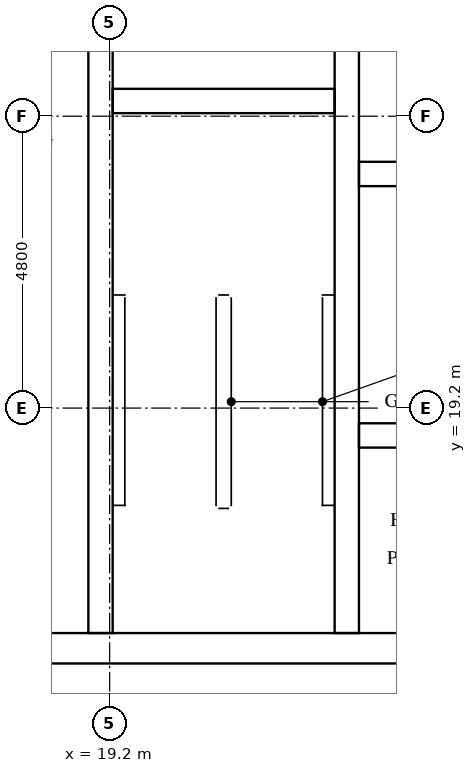
"""IFC4 building model, lengths in metres.
Left out: names, types, materials, properties, quantities, classifications, styles, units other than length and angle.
Written with IfcOpenShell. Run it as: python <this file> out.ifc"""

import sys

from ifc_helpers import new_model, si_unit, direction, frame, frame_2d, origin, place, context, subcontext, project, spatial, rectangle, extrude, element, fill, save


model = new_model("IFC4")
c1 = context("Model", 3, precision=1e-05, world=origin(), true_north=direction((0.0, 1.0)))
c2 = subcontext(c1, "Body", "Model", "MODEL_VIEW")
j1 = project(units=[si_unit("LENGTHUNIT", "METRE"), si_unit("PLANEANGLEUNIT", "RADIAN")], contexts=[c1])
p1 = place(None, origin())
s1 = spatial("IfcSite", under=j1, at=p1, CompositionType="ELEMENT")
p2 = place(p1, origin())
s2 = spatial("IfcBuilding", under=s1, at=p2, CompositionType="ELEMENT")
p3 = place(p2, frame((0.0, 0.0, 310.1)))
s3 = spatial("IfcBuildingStorey", under=s2, at=p3, CompositionType="ELEMENT", Elevation=310.1)
p4 = place(p3, frame((15.0, 15.25, 0.0), z_axis=(0.0, 0.0, 1.0), x_axis=(1.0, 0.0, 0.0)))
e1 = element("IfcWall", 1, at=p4, inside=s3, PredefinedType="SHEAR", context=c2, shape_type="SweptSolid", body=[
    extrude(rectangle(XDim=32.4, YDim=0.5, at=frame_2d((16.2, 0.0))), origin(), (0.0, 0.0, 1.0), 3.8),
])
p5 = place(p4, frame((15.3, 0.0, 0.0)))
e2 = element("IfcOpeningElement", 2, at=p5, cuts=e1, PredefinedType="OPENING", context=c2, shape_type="SweptSolid", body=[
    extrude(rectangle(XDim=1.8, YDim=2.1, at=frame_2d((0.9, 1.05))), frame((0.0, 0.26, 0.0), z_axis=(0.0, -1.0, 0.0), x_axis=(1.0, 0.0, 0.0)), (0.0, 0.0, 1.0), 0.52),
])
p6 = place(p3, frame((19.05, 15.5, 0.0), z_axis=(0.0, 0.0, 1.0), x_axis=(0.0, 1.0, 0.0)))
e3 = element("IfcWall", 3, at=p6, inside=s3, PredefinedType="SHEAR", context=c2, shape_type="SweptSolid", body=[
    extrude(rectangle(XDim=15.55, YDim=0.4, at=frame_2d((7.775, 0.0))), origin(), (0.0, 0.0, 1.0), 3.8),
])
p7 = place(p6, frame((9.95, 0.0, 0.0)))
e4 = element("IfcOpeningElement", 4, at=p7, cuts=e3, PredefinedType="OPENING", context=c2, shape_type="SweptSolid", body=[
    extrude(rectangle(XDim=1.1, YDim=2.1, at=frame_2d((0.55, 1.05))), frame((0.0, 0.21, 0.0), z_axis=(0.0, -1.0, 0.0), x_axis=(1.0, 0.0, 0.0)), (0.0, 0.0, 1.0), 0.42),
])
p8 = place(p6, frame((13.45, 0.0, 0.0)))
e5 = element("IfcOpeningElement", 5, at=p8, cuts=e3, PredefinedType="OPENING", context=c2, shape_type="SweptSolid", body=[
    extrude(rectangle(XDim=1.1, YDim=2.1, at=frame_2d((0.55, 1.05))), frame((0.0, 0.21, 0.0), z_axis=(0.0, -1.0, 0.0), x_axis=(1.0, 0.0, 0.0)), (0.0, 0.0, 1.0), 0.42),
])
p9 = place(p6, frame((0.7, 0.0, 0.0)))
e6 = element("IfcOpeningElement", 6, at=p9, cuts=e3, PredefinedType="OPENING", context=c2, shape_type="SweptSolid", body=[
    extrude(rectangle(XDim=1.2, YDim=2.1, at=frame_2d((0.6, 1.05))), frame((0.0, 0.21, 0.0), z_axis=(0.0, -1.0, 0.0), x_axis=(1.0, 0.0, 0.0)), (0.0, 0.0, 1.0), 0.42),
])
p10 = place(p3, frame((23.1, 15.5, 0.0), z_axis=(0.0, 0.0, 1.0), x_axis=(0.0, 1.0, 0.0)))
e7 = element("IfcWall", 7, at=p10, inside=s3, PredefinedType="SHEAR", context=c2, shape_type="SweptSolid", body=[
    extrude(rectangle(XDim=21.8, YDim=0.4, at=frame_2d((10.9, 0.0))), origin(), (0.0, 0.0, 1.0), 3.8),
])
p11 = place(p3, frame((19.25, 24.25, 0.0), z_axis=(0.0, 0.0, 1.0), x_axis=(1.0, 0.0, 0.0)))
e8 = element("IfcWall", 8, at=p11, inside=s3, PredefinedType="SHEAR", context=c2, shape_type="SweptSolid", body=[
    extrude(rectangle(XDim=3.65, YDim=0.4, at=frame_2d((1.825, 0.0))), origin(), (0.0, 0.0, 1.0), 3.8),
])
p12 = place(p3, frame((23.3, 18.75, 0.0), z_axis=(0.0, 0.0, 1.0), x_axis=(1.0, 0.0, 0.0)))
e9 = element("IfcWall", 9, at=p12, inside=s3, PredefinedType="SHEAR", context=c2, shape_type="SweptSolid", body=[
    extrude(rectangle(XDim=5.6, YDim=0.4, at=frame_2d((2.8, 0.0))), origin(), (0.0, 0.0, 1.0), 3.8),
])
p13 = place(p12, frame((0.984, 0.0, 0.0)))
e10 = element("IfcOpeningElement", 10, at=p13, cuts=e9, PredefinedType="OPENING", context=c2, shape_type="SweptSolid", body=[
    extrude(rectangle(XDim=1.0, YDim=2.1, at=frame_2d((0.5, 1.05))), frame((0.0, 0.21, 0.0), z_axis=(0.0, -1.0, 0.0), x_axis=(1.0, 0.0, 0.0)), (0.0, 0.0, 1.0), 0.42),
])
p14 = place(p12, frame((3.684, 0.0, 0.0)))
e11 = element("IfcOpeningElement", 11, at=p14, cuts=e9, PredefinedType="OPENING", context=c2, shape_type="SweptSolid", body=[
    extrude(rectangle(XDim=1.0, YDim=2.1, at=frame_2d((0.5, 1.05))), frame((0.0, 0.21, 0.0), z_axis=(0.0, -1.0, 0.0), x_axis=(1.0, 0.0, 0.0)), (0.0, 0.0, 1.0), 0.42),
])
p15 = place(p3, frame((23.3, 23.05, 0.0), z_axis=(0.0, 0.0, 1.0), x_axis=(1.0, 0.0, 0.0)))
e12 = element("IfcWall", 12, at=p15, inside=s3, PredefinedType="SHEAR", context=c2, shape_type="SweptSolid", body=[
    extrude(rectangle(XDim=15.8, YDim=0.4, at=frame_2d((7.9, 0.0))), origin(), (0.0, 0.0, 1.0), 3.8),
])
p16 = place(p15, frame((1.662, 0.0, 0.0)))
e13 = element("IfcOpeningElement", 13, at=p16, cuts=e12, PredefinedType="OPENING", context=c2, shape_type="SweptSolid", body=[
    extrude(rectangle(XDim=1.0, YDim=2.1, at=frame_2d((0.5, 1.05))), frame((0.0, 0.21, 0.0), z_axis=(0.0, -1.0, 0.0), x_axis=(1.0, 0.0, 0.0)), (0.0, 0.0, 1.0), 0.42),
])
p17 = place(p15, frame((5.662, 0.0, 0.0)))
e14 = element("IfcOpeningElement", 14, at=p17, cuts=e12, PredefinedType="OPENING", context=c2, shape_type="SweptSolid", body=[
    extrude(rectangle(XDim=1.0, YDim=2.1, at=frame_2d((0.5, 1.05))), frame((0.0, 0.21, 0.0), z_axis=(0.0, -1.0, 0.0), x_axis=(1.0, 0.0, 0.0)), (0.0, 0.0, 1.0), 0.42),
])
p18 = place(p15, frame((9.612, 0.0, 0.0)))
e15 = element("IfcOpeningElement", 15, at=p18, cuts=e12, PredefinedType="OPENING", context=c2, shape_type="SweptSolid", body=[
    extrude(rectangle(XDim=1.0, YDim=2.1, at=frame_2d((0.5, 1.05))), frame((0.0, 0.21, 0.0), z_axis=(0.0, -1.0, 0.0), x_axis=(1.0, 0.0, 0.0)), (0.0, 0.0, 1.0), 0.42),
])
p19 = place(p15, frame((13.612, 0.0, 0.0)))
e16 = element("IfcOpeningElement", 16, at=p19, cuts=e12, PredefinedType="OPENING", context=c2, shape_type="SweptSolid", body=[
    extrude(rectangle(XDim=1.0, YDim=2.1, at=frame_2d((0.5, 1.05))), frame((0.0, 0.21, 0.0), z_axis=(0.0, -1.0, 0.0), x_axis=(1.0, 0.0, 0.0)), (0.0, 0.0, 1.0), 0.42),
])
p20 = place(p9, frame((1.2, 0.0, 0.0), z_axis=(0.0, 0.0, 1.0), x_axis=(-1.0, 0.0, 0.0)))
e17 = element("IfcDoor", 17, at=p20, inside=s3, OperationType="SINGLE_SWING_RIGHT", PredefinedType="DOOR", context=c2, shape_type="SweptSolid", body=[
    extrude(rectangle(XDim=1.2, YDim=2.1, at=frame_2d((0.6, 1.05))), frame((0.0, 0.025, 0.0), z_axis=(0.0, -1.0, 0.0), x_axis=(1.0, 0.0, 0.0)), (0.0, 0.0, 1.0), 0.05),
])
fill(e6, e17)
save(model, sys.argv[1])
